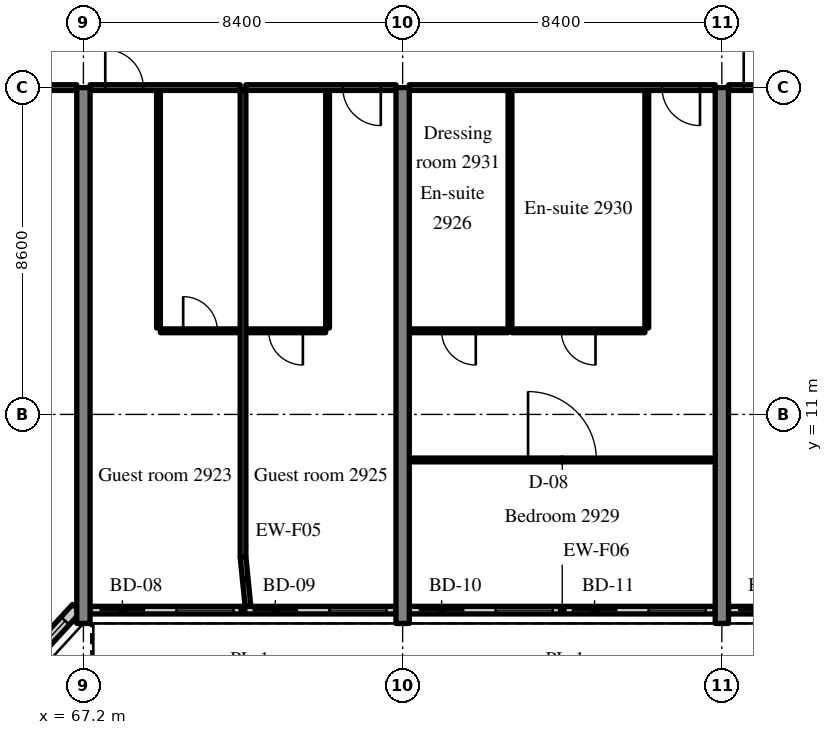
"""IFC4 building model, lengths in metres.
Left out: names, types, materials, properties, quantities, classifications, styles, units other than length and angle.
Written with IfcOpenShell. Run it as: python <this file> out.ifc"""

import sys

from ifc_helpers import new_model, si_unit, direction, frame, frame_2d, origin, place, context, subcontext, project, spatial, rectangle, extrude, source, transform, mapped, element, fill, save


model = new_model("IFC4")
c1 = context("Model", 3, precision=1e-05, world=origin(), true_north=direction((0.0, 1.0)))
c2 = subcontext(c1, "Body", "Model", "MODEL_VIEW")
j1 = project(units=[si_unit("LENGTHUNIT", "METRE"), si_unit("PLANEANGLEUNIT", "RADIAN")], contexts=[c1])
p1 = place(None, origin())
s1 = spatial("IfcSite", under=j1, at=p1, CompositionType="ELEMENT")
p2 = place(p1, origin())
s2 = spatial("IfcBuilding", under=s1, at=p2, CompositionType="ELEMENT")
p3 = place(p2, frame((0.0, 0.0, 121.8)))
s3 = spatial("IfcBuildingStorey", under=s2, at=p3, CompositionType="ELEMENT", Elevation=121.8)
m1 = source(origin(), c2, "Body", "SweptSolid", [
    extrude(rectangle(XDim=14.1, YDim=0.35, at=frame_2d((7.05, 0.0))), origin(), (0.0, 0.0, 1.0), 3.52),
])
for number, where, z_axis, x_axis in (
    (1, (67.2, 5.5, 0.0), (0.0, 0.0, 1.0), (0.0, 1.0, 0.0)),
    (2, (75.6, 5.5, 0.0), (0.0, 0.0, 1.0), (0.0, 1.0, 0.0)),
    (3, (84.0, 5.5, 0.0), (0.0, 0.0, 1.0), (0.0, 1.0, 0.0)),
):
    element("IfcWall", number, at=place(p3, frame(where, z_axis=z_axis, x_axis=x_axis)), inside=s3, PredefinedType="SHEAR", context=c2, shape_type="MappedRepresentation", body=[
        mapped(m1, transform((0.0, 0.0, 0.0), scale=1.0)),
    ])
m2 = source(origin(), c2, "Body", "SweptSolid", [
    extrude(rectangle(XDim=2.398, YDim=0.3, at=frame_2d((1.199, 0.0))), origin(), (0.0, 0.0, 1.0), 3.52),
])
p4 = place(p3, frame((65.404, 4.131, 0.0), z_axis=(0.0, 0.0, 1.0), x_axis=(0.675374189419, 0.737475222815, 0.0)))
e4 = element("IfcWall", 4, at=p4, inside=s3, PredefinedType="SOLIDWALL", context=c2, shape_type="MappedRepresentation", body=[
    mapped(m2, transform((0.0, 0.0, 0.0), scale=1.0)),
])
m3 = source(origin(), c2, "Body", "SweptSolid", [
    extrude(rectangle(XDim=1.5, YDim=2.0, at=frame_2d((0.75, 1.0))), frame((0.0, 0.16, 0.0), z_axis=(0.0, -1.0, 0.0), x_axis=(1.0, 0.0, 0.0)), (0.0, 0.0, 1.0), 0.32),
])
p5 = place(p4, frame((0.449, 0.0, 0.9)))
e5 = element("IfcOpeningElement", 5, at=p5, cuts=e4, PredefinedType="OPENING", context=c2, shape_type="MappedRepresentation", body=[
    mapped(m3, transform((0.0, 0.0, 0.0), scale=1.0)),
])
m4 = source(origin(), c2, "Body", "SweptSolid", [
    extrude(rectangle(XDim=8.05, YDim=0.2, at=frame_2d((4.025, 0.0))), origin(), (0.0, 0.0, 1.0), 2.82),
])
p6 = place(p3, frame((67.375, 5.85, 0.0), z_axis=(0.0, 0.0, 1.0), x_axis=(1.0, 0.0, 0.0)))
e6 = element("IfcWall", 6, at=p6, inside=s3, PredefinedType="SOLIDWALL", context=c2, shape_type="MappedRepresentation", body=[
    mapped(m4, transform((0.0, 0.0, 0.0), scale=1.0)),
])
m5 = source(origin(), c2, "Body", "SweptSolid", [
    extrude(rectangle(XDim=1.2, YDim=2.4, at=frame_2d((0.6, 1.2))), frame((0.0, 0.11, 0.0), z_axis=(0.0, -1.0, 0.0), x_axis=(1.0, 0.0, 0.0)), (0.0, 0.0, 1.0), 0.22),
])
p7 = place(p6, frame((0.25, 0.0, 0.0)))
e7 = element("IfcOpeningElement", 7, at=p7, cuts=e6, PredefinedType="OPENING", context=c2, shape_type="MappedRepresentation", body=[
    mapped(m5, transform((0.0, 0.0, 0.0), scale=1.0)),
])
m6 = source(origin(), c2, "Body", "SweptSolid", [
    extrude(rectangle(XDim=1.5, YDim=1.5, at=frame_2d((0.75, 0.75))), frame((0.0, 0.11, 0.0), z_axis=(0.0, -1.0, 0.0), x_axis=(1.0, 0.0, 0.0)), (0.0, 0.0, 1.0), 0.22),
])
p8 = place(p6, frame((2.275, 0.0, 0.9)))
e8 = element("IfcOpeningElement", 8, at=p8, cuts=e6, PredefinedType="OPENING", context=c2, shape_type="MappedRepresentation", body=[
    mapped(m6, transform((0.0, 0.0, 0.0), scale=1.0)),
])
p9 = place(p6, frame((4.275, 0.0, 0.0)))
e9 = element("IfcOpeningElement", 9, at=p9, cuts=e6, PredefinedType="OPENING", context=c2, shape_type="MappedRepresentation", body=[
    mapped(m5, transform((0.0, 0.0, 0.0), scale=1.0)),
])
p10 = place(p6, frame((6.3, 0.0, 0.9)))
e10 = element("IfcOpeningElement", 10, at=p10, cuts=e6, PredefinedType="OPENING", context=c2, shape_type="MappedRepresentation", body=[
    mapped(m6, transform((0.0, 0.0, 0.0), scale=1.0)),
])
p11 = place(p3, frame((75.775, 5.85, 0.0), z_axis=(0.0, 0.0, 1.0), x_axis=(1.0, 0.0, 0.0)))
e11 = element("IfcWall", 11, at=p11, inside=s3, PredefinedType="SOLIDWALL", context=c2, shape_type="MappedRepresentation", body=[
    mapped(m4, transform((0.0, 0.0, 0.0), scale=1.0)),
])
p12 = place(p11, frame((0.25, 0.0, 0.0)))
e12 = element("IfcOpeningElement", 12, at=p12, cuts=e11, PredefinedType="OPENING", context=c2, shape_type="MappedRepresentation", body=[
    mapped(m5, transform((0.0, 0.0, 0.0), scale=1.0)),
])
p13 = place(p11, frame((2.275, 0.0, 0.9)))
e13 = element("IfcOpeningElement", 13, at=p13, cuts=e11, PredefinedType="OPENING", context=c2, shape_type="MappedRepresentation", body=[
    mapped(m6, transform((0.0, 0.0, 0.0), scale=1.0)),
])
p14 = place(p11, frame((4.275, 0.0, 0.0)))
e14 = element("IfcOpeningElement", 14, at=p14, cuts=e11, PredefinedType="OPENING", context=c2, shape_type="MappedRepresentation", body=[
    mapped(m5, transform((0.0, 0.0, 0.0), scale=1.0)),
])
p15 = place(p11, frame((6.3, 0.0, 0.9)))
e15 = element("IfcOpeningElement", 15, at=p15, cuts=e11, PredefinedType="OPENING", context=c2, shape_type="MappedRepresentation", body=[
    mapped(m6, transform((0.0, 0.0, 0.0), scale=1.0)),
])
p16 = place(p3, frame((84.175, 5.85, 0.0), z_axis=(0.0, 0.0, 1.0), x_axis=(1.0, 0.0, 0.0)))
e16 = element("IfcWall", 16, at=p16, inside=s3, PredefinedType="SOLIDWALL", context=c2, shape_type="MappedRepresentation", body=[
    mapped(m4, transform((0.0, 0.0, 0.0), scale=1.0)),
])
p17 = place(p16, frame((0.25, 0.0, 0.0)))
e17 = element("IfcOpeningElement", 17, at=p17, cuts=e16, PredefinedType="OPENING", context=c2, shape_type="MappedRepresentation", body=[
    mapped(m5, transform((0.0, 0.0, 0.0), scale=1.0)),
])
p18 = place(p16, frame((2.275, 0.0, 0.9)))
e18 = element("IfcOpeningElement", 18, at=p18, cuts=e16, PredefinedType="OPENING", context=c2, shape_type="MappedRepresentation", body=[
    mapped(m6, transform((0.0, 0.0, 0.0), scale=1.0)),
])
p19 = place(p16, frame((4.275, 0.0, 0.0)))
e19 = element("IfcOpeningElement", 19, at=p19, cuts=e16, PredefinedType="OPENING", context=c2, shape_type="MappedRepresentation", body=[
    mapped(m5, transform((0.0, 0.0, 0.0), scale=1.0)),
])
p20 = place(p16, frame((6.3, 0.0, 0.9)))
e20 = element("IfcOpeningElement", 20, at=p20, cuts=e16, PredefinedType="OPENING", context=c2, shape_type="MappedRepresentation", body=[
    mapped(m6, transform((0.0, 0.0, 0.0), scale=1.0)),
])
m7 = source(origin(), c2, "Body", "SweptSolid", [
    extrude(rectangle(XDim=8.05, YDim=0.15, at=frame_2d((4.025, 0.0))), origin(), (0.0, 0.0, 1.0), 2.82),
])
p21 = place(p3, frame((58.975, 19.6, 0.0), z_axis=(0.0, 0.0, 1.0), x_axis=(1.0, 0.0, 0.0)))
e21 = element("IfcWall", 21, at=p21, inside=s3, PredefinedType="PARTITIONING", context=c2, shape_type="MappedRepresentation", body=[
    mapped(m7, transform((0.0, 0.0, 0.0), scale=1.0)),
])
m8 = source(origin(), c2, "Body", "SweptSolid", [
    extrude(rectangle(XDim=1.8, YDim=2.1, at=frame_2d((0.9, 1.05))), frame((0.0, 0.085, 0.0), z_axis=(0.0, -1.0, 0.0), x_axis=(1.0, 0.0, 0.0)), (0.0, 0.0, 1.0), 0.17),
])
p22 = place(p21, frame((3.125, 0.0, 0.0)))
e22 = element("IfcOpeningElement", 22, at=p22, cuts=e21, PredefinedType="OPENING", context=c2, shape_type="MappedRepresentation", body=[
    mapped(m8, transform((0.0, 0.0, 0.0), scale=1.0)),
])
m9 = source(origin(), c2, "Body", "SweptSolid", [
    extrude(rectangle(XDim=6.25, YDim=0.1, at=frame_2d((3.125, 0.0))), origin(), (0.0, 0.0, 1.0), 3.52),
])
p23 = place(p3, frame((69.175, 13.275, 0.0), z_axis=(0.0, 0.0, 1.0), x_axis=(0.0, 1.0, 0.0)))
e23 = element("IfcWall", 23, at=p23, inside=s3, PredefinedType="PARTITIONING", context=c2, shape_type="MappedRepresentation", body=[
    mapped(m9, transform((0.0, 0.0, 0.0), scale=1.0)),
])
m10 = source(origin(), c2, "Body", "SweptSolid", [
    extrude(rectangle(XDim=2.1, YDim=0.1, at=frame_2d((1.05, 0.0))), origin(), (0.0, 0.0, 1.0), 3.52),
])
p24 = place(p3, frame((69.225, 13.2, 0.0), z_axis=(0.0, 0.0, 1.0), x_axis=(1.0, 0.0, 0.0)))
e24 = element("IfcWall", 24, at=p24, inside=s3, PredefinedType="PARTITIONING", context=c2, shape_type="MappedRepresentation", body=[
    mapped(m10, transform((0.0, 0.0, 0.0), scale=1.0)),
])
m11 = source(origin(), c2, "Body", "SweptSolid", [
    extrude(rectangle(XDim=0.9, YDim=2.1, at=frame_2d((0.45, 1.05))), frame((0.0, 0.06, 0.0), z_axis=(0.0, -1.0, 0.0), x_axis=(1.0, 0.0, 0.0)), (0.0, 0.0, 1.0), 0.12),
])
p25 = place(p24, frame((0.6, 0.0, 0.0)))
e25 = element("IfcOpeningElement", 25, at=p25, cuts=e24, PredefinedType="OPENING", context=c2, shape_type="MappedRepresentation", body=[
    mapped(m11, transform((0.0, 0.0, 0.0), scale=1.0)),
])
m12 = source(origin(), c2, "Body", "SweptSolid", [
    extrude(rectangle(XDim=3.95, YDim=0.15, at=frame_2d((1.975, 0.0))), origin(), (0.0, 0.0, 1.0), 2.82),
])
p26 = place(p3, frame((67.375, 19.6, 0.0), z_axis=(0.0, 0.0, 1.0), x_axis=(1.0, 0.0, 0.0)))
e26 = element("IfcWall", 26, at=p26, inside=s3, PredefinedType="PARTITIONING", context=c2, shape_type="MappedRepresentation", body=[
    mapped(m12, transform((0.0, 0.0, 0.0), scale=1.0)),
])
m13 = source(origin(), c2, "Body", "SweptSolid", [
    extrude(rectangle(XDim=1.0, YDim=2.1, at=frame_2d((0.5, 1.05))), frame((0.0, 0.085, 0.0), z_axis=(0.0, -1.0, 0.0), x_axis=(1.0, 0.0, 0.0)), (0.0, 0.0, 1.0), 0.17),
])
p27 = place(p26, frame((0.4, 0.0, 0.0)))
e27 = element("IfcOpeningElement", 27, at=p27, cuts=e26, PredefinedType="OPENING", context=c2, shape_type="MappedRepresentation", body=[
    mapped(m13, transform((0.0, 0.0, 0.0), scale=1.0)),
])
p28 = place(p3, frame((73.625, 13.275, 0.0), z_axis=(0.0, 0.0, 1.0), x_axis=(0.0, 1.0, 0.0)))
e28 = element("IfcWall", 28, at=p28, inside=s3, PredefinedType="PARTITIONING", context=c2, shape_type="MappedRepresentation", body=[
    mapped(m9, transform((0.0, 0.0, 0.0), scale=1.0)),
])
p29 = place(p3, frame((71.475, 13.2, 0.0), z_axis=(0.0, 0.0, 1.0), x_axis=(1.0, 0.0, 0.0)))
e29 = element("IfcWall", 29, at=p29, inside=s3, PredefinedType="PARTITIONING", context=c2, shape_type="MappedRepresentation", body=[
    mapped(m10, transform((0.0, 0.0, 0.0), scale=1.0)),
])
p30 = place(p29, frame((0.6, 0.0, 0.0)))
e30 = element("IfcOpeningElement", 30, at=p30, cuts=e29, PredefinedType="OPENING", context=c2, shape_type="MappedRepresentation", body=[
    mapped(m11, transform((0.0, 0.0, 0.0), scale=1.0)),
])
p31 = place(p3, frame((71.475, 19.6, 0.0), z_axis=(0.0, 0.0, 1.0), x_axis=(1.0, 0.0, 0.0)))
e31 = element("IfcWall", 31, at=p31, inside=s3, PredefinedType="PARTITIONING", context=c2, shape_type="MappedRepresentation", body=[
    mapped(m12, transform((0.0, 0.0, 0.0), scale=1.0)),
])
p32 = place(p31, frame((2.55, 0.0, 0.0)))
e32 = element("IfcOpeningElement", 32, at=p32, cuts=e31, PredefinedType="OPENING", context=c2, shape_type="MappedRepresentation", body=[
    mapped(m13, transform((0.0, 0.0, 0.0), scale=1.0)),
])
m14 = source(origin(), c2, "Body", "SweptSolid", [
    extrude(rectangle(XDim=12.275, YDim=0.15, at=frame_2d((6.137, 0.0))), origin(), (0.0, 0.0, 1.0), 3.52),
])
p33 = place(p3, frame((71.4, 7.25, 0.0), z_axis=(0.0, 0.0, 1.0), x_axis=(0.0, 1.0, 0.0)))
e33 = element("IfcWall", 33, at=p33, inside=s3, PredefinedType="PARTITIONING", context=c2, shape_type="MappedRepresentation", body=[
    mapped(m14, transform((0.0, 0.0, 0.0), scale=1.0)),
])
for number, where, z_axis, x_axis in (
    (34, (82.025, 13.275, 0.0), (0.0, 0.0, 1.0), (0.0, 1.0, 0.0)),
    (35, (78.425, 13.275, 0.0), (0.0, 0.0, 1.0), (0.0, 1.0, 0.0)),
):
    element("IfcWall", number, at=place(p3, frame(where, z_axis=z_axis, x_axis=x_axis)), inside=s3, PredefinedType="PARTITIONING", context=c2, shape_type="MappedRepresentation", body=[
        mapped(m9, transform((0.0, 0.0, 0.0), scale=1.0)),
    ])
m15 = source(origin(), c2, "Body", "SweptSolid", [
    extrude(rectangle(XDim=3.5, YDim=0.1, at=frame_2d((1.75, 0.0))), origin(), (0.0, 0.0, 1.0), 3.52),
])
p34 = place(p3, frame((78.475, 13.2, 0.0), z_axis=(0.0, 0.0, 1.0), x_axis=(1.0, 0.0, 0.0)))
e36 = element("IfcWall", 36, at=p34, inside=s3, PredefinedType="PARTITIONING", context=c2, shape_type="MappedRepresentation", body=[
    mapped(m15, transform((0.0, 0.0, 0.0), scale=1.0)),
])
p35 = place(p34, frame((1.3, 0.0, 0.0)))
e37 = element("IfcOpeningElement", 37, at=p35, cuts=e36, PredefinedType="OPENING", context=c2, shape_type="MappedRepresentation", body=[
    mapped(m11, transform((0.0, 0.0, 0.0), scale=1.0)),
])
m16 = source(origin(), c2, "Body", "SweptSolid", [
    extrude(rectangle(XDim=2.6, YDim=0.1, at=frame_2d((1.3, 0.0))), origin(), (0.0, 0.0, 1.0), 3.52),
])
p36 = place(p3, frame((75.775, 13.2, 0.0), z_axis=(0.0, 0.0, 1.0), x_axis=(1.0, 0.0, 0.0)))
e38 = element("IfcWall", 38, at=p36, inside=s3, PredefinedType="PARTITIONING", context=c2, shape_type="MappedRepresentation", body=[
    mapped(m16, transform((0.0, 0.0, 0.0), scale=1.0)),
])
p37 = place(p36, frame((0.85, 0.0, 0.0)))
e39 = element("IfcOpeningElement", 39, at=p37, cuts=e38, PredefinedType="OPENING", context=c2, shape_type="MappedRepresentation", body=[
    mapped(m11, transform((0.0, 0.0, 0.0), scale=1.0)),
])
m17 = source(origin(), c2, "Body", "SweptSolid", [
    extrude(rectangle(XDim=8.05, YDim=0.1, at=frame_2d((4.025, 0.0))), origin(), (0.0, 0.0, 1.0), 3.52),
])
p38 = place(p3, frame((75.775, 9.802, 0.0), z_axis=(0.0, 0.0, 1.0), x_axis=(1.0, 0.0, 0.0)))
e40 = element("IfcWall", 40, at=p38, inside=s3, PredefinedType="PARTITIONING", context=c2, shape_type="MappedRepresentation", body=[
    mapped(m17, transform((0.0, 0.0, 0.0), scale=1.0)),
])
m18 = source(origin(), c2, "Body", "SweptSolid", [
    extrude(rectangle(XDim=1.8, YDim=2.1, at=frame_2d((0.9, 1.05))), frame((0.0, 0.06, 0.0), z_axis=(0.0, -1.0, 0.0), x_axis=(1.0, 0.0, 0.0)), (0.0, 0.0, 1.0), 0.12),
])
p39 = place(p38, frame((3.125, 0.0, 0.0)))
e41 = element("IfcOpeningElement", 41, at=p39, cuts=e40, PredefinedType="OPENING", context=c2, shape_type="MappedRepresentation", body=[
    mapped(m18, transform((0.0, 0.0, 0.0), scale=1.0)),
])
m19 = source(origin(), c2, "Body", "SweptSolid", [
    extrude(rectangle(XDim=8.05, YDim=0.15, at=frame_2d((4.025, 0.0))), origin(), (0.0, 0.0, 1.0), 2.82),
])
p40 = place(p3, frame((75.775, 19.6, 0.0), z_axis=(0.0, 0.0, 1.0), x_axis=(1.0, 0.0, 0.0)))
e42 = element("IfcWall", 42, at=p40, inside=s3, PredefinedType="PARTITIONING", context=c2, shape_type="MappedRepresentation", body=[
    mapped(m19, transform((0.0, 0.0, 0.0), scale=1.0)),
])
p41 = place(p40, frame((6.65, 0.0, 0.0)))
e43 = element("IfcOpeningElement", 43, at=p41, cuts=e42, PredefinedType="OPENING", context=c2, shape_type="MappedRepresentation", body=[
    mapped(m13, transform((0.0, 0.0, 0.0), scale=1.0)),
])
p42 = place(p3, frame((84.175, 19.6, 0.0), z_axis=(0.0, 0.0, 1.0), x_axis=(1.0, 0.0, 0.0)))
e44 = element("IfcWall", 44, at=p42, inside=s3, PredefinedType="PARTITIONING", context=c2, shape_type="MappedRepresentation", body=[
    mapped(m19, transform((0.0, 0.0, 0.0), scale=1.0)),
])
p43 = place(p42, frame((0.4, 0.0, 0.0)))
e45 = element("IfcOpeningElement", 45, at=p43, cuts=e44, PredefinedType="OPENING", context=c2, shape_type="MappedRepresentation", body=[
    mapped(m13, transform((0.0, 0.0, 0.0), scale=1.0)),
])
m20 = source(origin(), c2, "Body", "SweptSolid", [
    extrude(rectangle(XDim=1.307, YDim=0.15, at=frame_2d((0.653, 0.0))), origin(), (0.0, 0.0, 1.0), 3.52),
])
p44 = place(p3, frame((71.53, 5.95, 0.0), z_axis=(0.0, 0.0, 1.0), x_axis=(-0.099596223396, 0.99502793543, 0.0)))
e46 = element("IfcWall", 46, at=p44, inside=s3, PredefinedType="PARTITIONING", context=c2, shape_type="MappedRepresentation", body=[
    mapped(m20, transform((0.0, 0.0, 0.0), scale=1.0)),
])
m21 = source(origin(), c2, "Body", "SweptSolid", [
    extrude(rectangle(XDim=1.5, YDim=2.0, at=frame_2d((0.75, 1.0))), frame((0.0, 0.03, 0.0), z_axis=(0.0, -1.0, 0.0), x_axis=(1.0, 0.0, 0.0)), (0.0, 0.0, 1.0), 0.06),
])
p45 = place(p5, origin())
e47 = element("IfcWindow", 47, at=p45, inside=s3, PartitioningType="SINGLE_PANEL", PredefinedType="WINDOW", context=c2, shape_type="MappedRepresentation", body=[
    mapped(m21, transform((0.0, 0.0, 0.0), scale=1.0)),
])
fill(e5, e47)
m22 = source(origin(), c2, "Body", "SweptSolid", [
    extrude(rectangle(XDim=1.2, YDim=2.4, at=frame_2d((0.6, 1.2))), frame((0.0, 0.025, 0.0), z_axis=(0.0, -1.0, 0.0), x_axis=(1.0, 0.0, 0.0)), (0.0, 0.0, 1.0), 0.05),
])
p46 = place(p7, origin())
e48 = element("IfcDoor", 48, at=p46, inside=s3, OperationType="SLIDING_TO_RIGHT", PredefinedType="DOOR", context=c2, shape_type="MappedRepresentation", body=[
    mapped(m22, transform((0.0, 0.0, 0.0), scale=1.0)),
])
fill(e7, e48)
m23 = source(origin(), c2, "Body", "SweptSolid", [
    extrude(rectangle(XDim=1.5, YDim=1.5, at=frame_2d((0.75, 0.75))), frame((0.0, 0.03, 0.0), z_axis=(0.0, -1.0, 0.0), x_axis=(1.0, 0.0, 0.0)), (0.0, 0.0, 1.0), 0.06),
])
p47 = place(p8, origin())
e49 = element("IfcWindow", 49, at=p47, inside=s3, PartitioningType="SINGLE_PANEL", PredefinedType="WINDOW", context=c2, shape_type="MappedRepresentation", body=[
    mapped(m23, transform((0.0, 0.0, 0.0), scale=1.0)),
])
fill(e8, e49)
p48 = place(p9, origin())
e50 = element("IfcDoor", 50, at=p48, inside=s3, OperationType="SLIDING_TO_LEFT", PredefinedType="DOOR", context=c2, shape_type="MappedRepresentation", body=[
    mapped(m22, transform((0.0, 0.0, 0.0), scale=1.0)),
])
fill(e9, e50)
p49 = place(p10, origin())
e51 = element("IfcWindow", 51, at=p49, inside=s3, PartitioningType="SINGLE_PANEL", PredefinedType="WINDOW", context=c2, shape_type="MappedRepresentation", body=[
    mapped(m23, transform((0.0, 0.0, 0.0), scale=1.0)),
])
fill(e10, e51)
p50 = place(p12, origin())
e52 = element("IfcDoor", 52, at=p50, inside=s3, OperationType="SLIDING_TO_RIGHT", PredefinedType="DOOR", context=c2, shape_type="MappedRepresentation", body=[
    mapped(m22, transform((0.0, 0.0, 0.0), scale=1.0)),
])
fill(e12, e52)
p51 = place(p13, origin())
e53 = element("IfcWindow", 53, at=p51, inside=s3, PartitioningType="SINGLE_PANEL", PredefinedType="WINDOW", context=c2, shape_type="MappedRepresentation", body=[
    mapped(m23, transform((0.0, 0.0, 0.0), scale=1.0)),
])
fill(e13, e53)
p52 = place(p14, origin())
e54 = element("IfcDoor", 54, at=p52, inside=s3, OperationType="SLIDING_TO_LEFT", PredefinedType="DOOR", context=c2, shape_type="MappedRepresentation", body=[
    mapped(m22, transform((0.0, 0.0, 0.0), scale=1.0)),
])
fill(e14, e54)
p53 = place(p15, origin())
e55 = element("IfcWindow", 55, at=p53, inside=s3, PartitioningType="SINGLE_PANEL", PredefinedType="WINDOW", context=c2, shape_type="MappedRepresentation", body=[
    mapped(m23, transform((0.0, 0.0, 0.0), scale=1.0)),
])
fill(e15, e55)
p54 = place(p17, origin())
e56 = element("IfcDoor", 56, at=p54, inside=s3, OperationType="SLIDING_TO_RIGHT", PredefinedType="DOOR", context=c2, shape_type="MappedRepresentation", body=[
    mapped(m22, transform((0.0, 0.0, 0.0), scale=1.0)),
])
fill(e17, e56)
m24 = source(origin(), c2, "Body", "SweptSolid", [
    extrude(rectangle(XDim=0.9, YDim=2.1, at=frame_2d((0.45, 1.05))), frame((0.0, 0.025, 0.0), z_axis=(0.0, -1.0, 0.0), x_axis=(1.0, 0.0, 0.0)), (0.0, 0.0, 1.0), 0.05),
])
p55 = place(p25, origin())
e57 = element("IfcDoor", 57, at=p55, inside=s3, OperationType="SINGLE_SWING_LEFT", PredefinedType="DOOR", context=c2, shape_type="MappedRepresentation", body=[
    mapped(m24, transform((0.0, 0.0, 0.0), scale=1.0)),
])
fill(e25, e57)
m25 = source(origin(), c2, "Body", "SweptSolid", [
    extrude(rectangle(XDim=1.0, YDim=2.1, at=frame_2d((0.5, 1.05))), frame((0.0, 0.025, 0.0), z_axis=(0.0, -1.0, 0.0), x_axis=(1.0, 0.0, 0.0)), (0.0, 0.0, 1.0), 0.05),
])
p56 = place(p27, origin())
e58 = element("IfcDoor", 58, at=p56, inside=s3, OperationType="SINGLE_SWING_LEFT", PredefinedType="DOOR", context=c2, shape_type="MappedRepresentation", body=[
    mapped(m25, transform((0.0, 0.0, 0.0), scale=1.0)),
])
fill(e27, e58)
p57 = place(p30, origin())
e59 = element("IfcDoor", 59, at=p57, inside=s3, OperationType="SINGLE_SWING_RIGHT", PredefinedType="DOOR", context=c2, shape_type="MappedRepresentation", body=[
    mapped(m24, transform((0.0, 0.0, 0.0), scale=1.0)),
])
fill(e30, e59)
p58 = place(p32, origin())
e60 = element("IfcDoor", 60, at=p58, inside=s3, OperationType="SINGLE_SWING_RIGHT", PredefinedType="DOOR", context=c2, shape_type="MappedRepresentation", body=[
    mapped(m25, transform((0.0, 0.0, 0.0), scale=1.0)),
])
fill(e32, e60)
p59 = place(p35, origin())
e61 = element("IfcDoor", 61, at=p59, inside=s3, OperationType="SINGLE_SWING_RIGHT", PredefinedType="DOOR", context=c2, shape_type="MappedRepresentation", body=[
    mapped(m24, transform((0.0, 0.0, 0.0), scale=1.0)),
])
fill(e37, e61)
p60 = place(p37, origin())
e62 = element("IfcDoor", 62, at=p60, inside=s3, OperationType="SINGLE_SWING_RIGHT", PredefinedType="DOOR", context=c2, shape_type="MappedRepresentation", body=[
    mapped(m24, transform((0.0, 0.0, 0.0), scale=1.0)),
])
fill(e39, e62)
m26 = source(origin(), c2, "Body", "SweptSolid", [
    extrude(rectangle(XDim=1.8, YDim=2.1, at=frame_2d((0.9, 1.05))), frame((0.0, 0.025, 0.0), z_axis=(0.0, -1.0, 0.0), x_axis=(1.0, 0.0, 0.0)), (0.0, 0.0, 1.0), 0.05),
])
p61 = place(p39, origin())
e63 = element("IfcDoor", 63, at=p61, inside=s3, OperationType="DOUBLE_DOOR_SINGLE_SWING", PredefinedType="DOOR", context=c2, shape_type="MappedRepresentation", body=[
    mapped(m26, transform((0.0, 0.0, 0.0), scale=1.0)),
])
fill(e41, e63)
p62 = place(p41, origin())
e64 = element("IfcDoor", 64, at=p62, inside=s3, OperationType="SINGLE_SWING_RIGHT", PredefinedType="DOOR", context=c2, shape_type="MappedRepresentation", body=[
    mapped(m25, transform((0.0, 0.0, 0.0), scale=1.0)),
])
fill(e43, e64)
p63 = place(p43, origin())
e65 = element("IfcDoor", 65, at=p63, inside=s3, OperationType="SINGLE_SWING_LEFT", PredefinedType="DOOR", context=c2, shape_type="MappedRepresentation", body=[
    mapped(m25, transform((0.0, 0.0, 0.0), scale=1.0)),
])
fill(e45, e65)
save(model, sys.argv[1])
